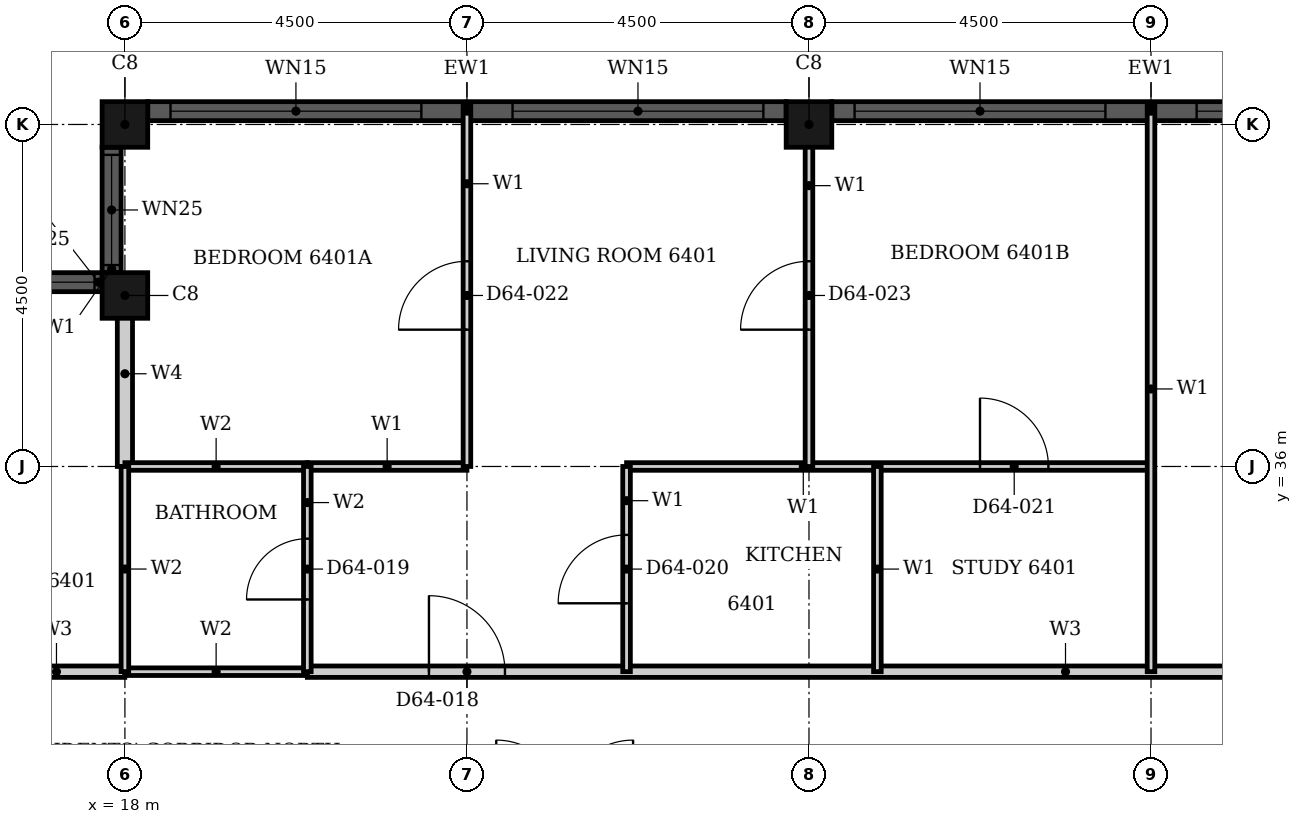
"""IFC4 building model, lengths in metres.
Left out: names, types, materials, properties, quantities, classifications, styles, units other than length and angle.
Written with IfcOpenShell. Run it as: python <this file> out.ifc"""

import sys

from ifc_helpers import new_model, si_unit, direction, frame, frame_2d, origin, origin_2d, place, context, subcontext, project, spatial, rectangle, hollow_rectangle, extrude, element, fill, save


model = new_model("IFC4")
c1 = context("Model", 3, precision=1e-05, world=origin(), true_north=direction((0.0, 1.0)))
c2 = subcontext(c1, "Body", "Model", "MODEL_VIEW")
j1 = project(units=[si_unit("LENGTHUNIT", "METRE"), si_unit("PLANEANGLEUNIT", "RADIAN")], contexts=[c1])
p1 = place(None, origin())
s1 = spatial("IfcSite", under=j1, at=p1, CompositionType="ELEMENT")
p2 = place(p1, origin())
s2 = spatial("IfcBuilding", under=s1, at=p2, CompositionType="ELEMENT")
p3 = place(p2, frame((0.0, 0.0, 252.7)))
s3 = spatial("IfcBuildingStorey", under=s2, at=p3, CompositionType="ELEMENT", Elevation=252.7)
for number, where, z_axis, x_axis in (
    (1, (27.0, 40.5, 0.0), (0.0, 0.0, 1.0), (1.0, 0.0, 0.0)),
    (2, (18.0, 40.5, 0.0), (0.0, 0.0, 1.0), (1.0, 0.0, 0.0)),
    (3, (18.0, 38.25, 0.0), (0.0, 0.0, 1.0), (1.0, 0.0, 0.0)),
):
    element("IfcColumn", number, at=place(p3, frame(where, z_axis=z_axis, x_axis=x_axis)), inside=s3, PredefinedType="COLUMN", context=c2, shape_type="SweptSolid", body=[
        extrude(hollow_rectangle(XDim=0.6, YDim=0.6, WallThickness=0.02, at=origin_2d()), origin(), (0.0, 0.0, 1.0), 3.7),
    ])
p4 = place(p3, frame((35.7, 40.675, 0.0), z_axis=(0.0, 0.0, 1.0), x_axis=(-1.0, 0.0, 0.0)))
e4 = element("IfcWall", 4, at=p4, inside=s3, PredefinedType="SOLIDWALL", context=c2, shape_type="SweptSolid", body=[
    extrude(rectangle(XDim=8.4, YDim=0.25, at=frame_2d((4.2, 0.0))), origin(), (0.0, 0.0, 1.0), 3.7),
])
p5 = place(p4, frame((0.3, 0.0, 0.45)))
e5 = element("IfcOpeningElement", 5, at=p5, cuts=e4, PredefinedType="OPENING", context=c2, shape_type="SweptSolid", body=[
    extrude(rectangle(XDim=3.3, YDim=2.3, at=frame_2d((1.65, 1.15))), frame((0.0, 0.135, 0.0), z_axis=(0.0, -1.0, 0.0), x_axis=(1.0, 0.0, 0.0)), (0.0, 0.0, 1.0), 0.27),
])
p6 = place(p4, frame((4.8, 0.0, 0.45)))
e6 = element("IfcOpeningElement", 6, at=p6, cuts=e4, PredefinedType="OPENING", context=c2, shape_type="SweptSolid", body=[
    extrude(rectangle(XDim=3.3, YDim=2.3, at=frame_2d((1.65, 1.15))), frame((0.0, 0.135, 0.0), z_axis=(0.0, -1.0, 0.0), x_axis=(1.0, 0.0, 0.0)), (0.0, 0.0, 1.0), 0.27),
])
p7 = place(p3, frame((26.7, 40.675, 0.0), z_axis=(0.0, 0.0, 1.0), x_axis=(-1.0, 0.0, 0.0)))
e7 = element("IfcWall", 7, at=p7, inside=s3, PredefinedType="SOLIDWALL", context=c2, shape_type="SweptSolid", body=[
    extrude(rectangle(XDim=8.4, YDim=0.25, at=frame_2d((4.2, 0.0))), origin(), (0.0, 0.0, 1.0), 3.7),
])
p8 = place(p7, frame((0.3, 0.0, 0.45)))
e8 = element("IfcOpeningElement", 8, at=p8, cuts=e7, PredefinedType="OPENING", context=c2, shape_type="SweptSolid", body=[
    extrude(rectangle(XDim=3.3, YDim=2.3, at=frame_2d((1.65, 1.15))), frame((0.0, 0.135, 0.0), z_axis=(0.0, -1.0, 0.0), x_axis=(1.0, 0.0, 0.0)), (0.0, 0.0, 1.0), 0.27),
])
p9 = place(p7, frame((4.8, 0.0, 0.45)))
e9 = element("IfcOpeningElement", 9, at=p9, cuts=e7, PredefinedType="OPENING", context=c2, shape_type="SweptSolid", body=[
    extrude(rectangle(XDim=3.3, YDim=2.3, at=frame_2d((1.65, 1.15))), frame((0.0, 0.135, 0.0), z_axis=(0.0, -1.0, 0.0), x_axis=(1.0, 0.0, 0.0)), (0.0, 0.0, 1.0), 0.27),
])
p10 = place(p3, frame((17.825, 40.2, 0.0), z_axis=(0.0, 0.0, 1.0), x_axis=(0.0, -1.0, 0.0)))
e10 = element("IfcWall", 10, at=p10, inside=s3, PredefinedType="SOLIDWALL", context=c2, shape_type="SweptSolid", body=[
    extrude(rectangle(XDim=1.65, YDim=0.25, at=frame_2d((0.825, 0.0))), origin(), (0.0, 0.0, 1.0), 3.7),
])
p11 = place(p10, frame((0.1, 0.0, 0.9)))
e11 = element("IfcOpeningElement", 11, at=p11, cuts=e10, PredefinedType="OPENING", context=c2, shape_type="SweptSolid", body=[
    extrude(rectangle(XDim=1.45, YDim=1.85, at=frame_2d((0.725, 0.925))), frame((0.0, 0.135, 0.0), z_axis=(0.0, -1.0, 0.0), x_axis=(1.0, 0.0, 0.0)), (0.0, 0.0, 1.0), 0.27),
])
p12 = place(p3, frame((17.7, 38.425, 0.0), z_axis=(0.0, 0.0, 1.0), x_axis=(-1.0, 0.0, 0.0)))
e12 = element("IfcWall", 12, at=p12, inside=s3, PredefinedType="SOLIDWALL", context=c2, shape_type="SweptSolid", body=[
    extrude(rectangle(XDim=1.65, YDim=0.25, at=frame_2d((0.825, 0.0))), origin(), (0.0, 0.0, 1.0), 3.7),
])
p13 = place(p12, frame((0.1, 0.0, 0.9)))
e13 = element("IfcOpeningElement", 13, at=p13, cuts=e12, PredefinedType="OPENING", context=c2, shape_type="SweptSolid", body=[
    extrude(rectangle(XDim=1.45, YDim=1.85, at=frame_2d((0.725, 0.925))), frame((0.0, 0.135, 0.0), z_axis=(0.0, -1.0, 0.0), x_axis=(1.0, 0.0, 0.0)), (0.0, 0.0, 1.0), 0.27),
])
p14 = place(p3, frame((20.4, 33.3, 0.0), z_axis=(0.0, 0.0, 1.0), x_axis=(1.0, 0.0, 0.0)))
e14 = element("IfcWall", 14, at=p14, inside=s3, PredefinedType="PARTITIONING", context=c2, shape_type="SweptSolid", body=[
    extrude(rectangle(XDim=24.6, YDim=0.15, at=frame_2d((12.3, 0.0))), origin(), (0.0, 0.0, 1.0), 3.4),
])
p15 = place(p14, frame((1.6, 0.0, 0.0)))
e15 = element("IfcOpeningElement", 15, at=p15, cuts=e14, PredefinedType="OPENING", context=c2, shape_type="SweptSolid", body=[
    extrude(rectangle(XDim=1.0, YDim=2.2, at=frame_2d((0.5, 1.1))), frame((0.0, 0.085, 0.0), z_axis=(0.0, -1.0, 0.0), x_axis=(1.0, 0.0, 0.0)), (0.0, 0.0, 1.0), 0.17),
])
p16 = place(p14, frame((17.35, 0.0, 0.0)))
e16 = element("IfcOpeningElement", 16, at=p16, cuts=e14, PredefinedType="OPENING", context=c2, shape_type="SweptSolid", body=[
    extrude(rectangle(XDim=1.0, YDim=2.1, at=frame_2d((0.5, 1.05))), frame((0.0, 0.085, 0.0), z_axis=(0.0, -1.0, 0.0), x_axis=(1.0, 0.0, 0.0)), (0.0, 0.0, 1.0), 0.17),
])
p17 = place(p3, frame((16.2, 33.3, 0.0), z_axis=(0.0, 0.0, 1.0), x_axis=(1.0, 0.0, 0.0)))
e17 = element("IfcWall", 17, at=p17, inside=s3, PredefinedType="PARTITIONING", context=c2, shape_type="SweptSolid", body=[
    extrude(rectangle(XDim=1.799, YDim=0.15, at=frame_2d((0.899, 0.0))), origin(), (0.0, 0.0, 1.0), 3.4),
])
p18 = place(p3, frame((20.4, 36.0, 0.0), z_axis=(0.0, 0.0, 1.0), x_axis=(1.0, 0.0, 0.0)))
e18 = element("IfcWall", 18, at=p18, inside=s3, PredefinedType="PARTITIONING", context=c2, shape_type="SweptSolid", body=[
    extrude(rectangle(XDim=2.1, YDim=0.1, at=frame_2d((1.05, 0.0))), origin(), (0.0, 0.0, 1.0), 3.4),
])
p19 = place(p3, frame((24.6, 36.0, 0.0), z_axis=(0.0, 0.0, 1.0), x_axis=(1.0, 0.0, 0.0)))
e19 = element("IfcWall", 19, at=p19, inside=s3, PredefinedType="PARTITIONING", context=c2, shape_type="SweptSolid", body=[
    extrude(rectangle(XDim=6.9, YDim=0.1, at=frame_2d((3.45, 0.0))), origin(), (0.0, 0.0, 1.0), 3.4),
])
p20 = place(p19, frame((4.65, 0.0, 0.0)))
e20 = element("IfcOpeningElement", 20, at=p20, cuts=e19, PredefinedType="OPENING", context=c2, shape_type="SweptSolid", body=[
    extrude(rectangle(XDim=0.9, YDim=2.1, at=frame_2d((0.45, 1.05))), frame((0.0, 0.06, 0.0), z_axis=(0.0, -1.0, 0.0), x_axis=(1.0, 0.0, 0.0)), (0.0, 0.0, 1.0), 0.12),
])
p21 = place(p3, frame((22.5, 36.0, 0.0), z_axis=(0.0, 0.0, 1.0), x_axis=(0.0, 1.0, 0.0)))
e21 = element("IfcWall", 21, at=p21, inside=s3, PredefinedType="PARTITIONING", context=c2, shape_type="SweptSolid", body=[
    extrude(rectangle(XDim=4.74, YDim=0.1, at=frame_2d((2.37, 0.0))), origin(), (0.0, 0.0, 1.0), 3.4),
])
p22 = place(p21, frame((1.8, 0.0, 0.0)))
e22 = element("IfcOpeningElement", 22, at=p22, cuts=e21, PredefinedType="OPENING", context=c2, shape_type="SweptSolid", body=[
    extrude(rectangle(XDim=0.9, YDim=2.1, at=frame_2d((0.45, 1.05))), frame((0.0, 0.06, 0.0), z_axis=(0.0, -1.0, 0.0), x_axis=(1.0, 0.0, 0.0)), (0.0, 0.0, 1.0), 0.12),
])
p23 = place(p3, frame((24.6, 33.3, 0.0), z_axis=(0.0, 0.0, 1.0), x_axis=(0.0, 1.0, 0.0)))
e23 = element("IfcWall", 23, at=p23, inside=s3, PredefinedType="PARTITIONING", context=c2, shape_type="SweptSolid", body=[
    extrude(rectangle(XDim=2.7, YDim=0.1, at=frame_2d((1.35, 0.0))), origin(), (0.0, 0.0, 1.0), 3.4),
])
p24 = place(p23, frame((0.9, 0.0, 0.0)))
e24 = element("IfcOpeningElement", 24, at=p24, cuts=e23, PredefinedType="OPENING", context=c2, shape_type="SweptSolid", body=[
    extrude(rectangle(XDim=0.9, YDim=2.1, at=frame_2d((0.45, 1.05))), frame((0.0, 0.06, 0.0), z_axis=(0.0, -1.0, 0.0), x_axis=(1.0, 0.0, 0.0)), (0.0, 0.0, 1.0), 0.12),
])
p25 = place(p3, frame((27.0, 36.0, 0.0), z_axis=(0.0, 0.0, 1.0), x_axis=(0.0, 1.0, 0.0)))
e25 = element("IfcWall", 25, at=p25, inside=s3, PredefinedType="PARTITIONING", context=c2, shape_type="SweptSolid", body=[
    extrude(rectangle(XDim=4.69, YDim=0.1, at=frame_2d((2.345, 0.0))), origin(), (0.0, 0.0, 1.0), 3.4),
])
p26 = place(p25, frame((1.8, 0.0, 0.0)))
e26 = element("IfcOpeningElement", 26, at=p26, cuts=e25, PredefinedType="OPENING", context=c2, shape_type="SweptSolid", body=[
    extrude(rectangle(XDim=0.9, YDim=2.1, at=frame_2d((0.45, 1.05))), frame((0.0, 0.06, 0.0), z_axis=(0.0, -1.0, 0.0), x_axis=(1.0, 0.0, 0.0)), (0.0, 0.0, 1.0), 0.12),
])
p27 = place(p3, frame((27.9, 33.3, 0.0), z_axis=(0.0, 0.0, 1.0), x_axis=(0.0, 1.0, 0.0)))
e27 = element("IfcWall", 27, at=p27, inside=s3, PredefinedType="PARTITIONING", context=c2, shape_type="SweptSolid", body=[
    extrude(rectangle(XDim=2.7, YDim=0.1, at=frame_2d((1.35, 0.0))), origin(), (0.0, 0.0, 1.0), 3.4),
])
p28 = place(p3, frame((31.5, 33.3, 0.0), z_axis=(0.0, 0.0, 1.0), x_axis=(0.0, 1.0, 0.0)))
e28 = element("IfcWall", 28, at=p28, inside=s3, PredefinedType="PARTITIONING", context=c2, shape_type="SweptSolid", body=[
    extrude(rectangle(XDim=7.44, YDim=0.1, at=frame_2d((3.72, 0.0))), origin(), (0.0, 0.0, 1.0), 3.4),
])
p29 = place(p3, frame((18.0, 36.0, 0.0), z_axis=(0.0, 0.0, 1.0), x_axis=(0.0, 1.0, 0.0)))
e29 = element("IfcWall", 29, at=p29, inside=s3, PredefinedType="PARTITIONING", context=c2, shape_type="SweptSolid", body=[
    extrude(rectangle(XDim=2.44, YDim=0.2, at=frame_2d((1.22, 0.0))), origin(), (0.0, 0.0, 1.0), 3.4),
])
for number, where, z_axis, x_axis in (
    (30, (18.0, 33.3, 0.0), (0.0, 0.0, 1.0), (1.0, 0.0, 0.0)),
    (31, (18.0, 36.0, 0.0), (0.0, 0.0, 1.0), (1.0, 0.0, 0.0)),
):
    element("IfcWall", number, at=place(p3, frame(where, z_axis=z_axis, x_axis=x_axis)), inside=s3, PredefinedType="PARTITIONING", context=c2, shape_type="SweptSolid", body=[
        extrude(rectangle(XDim=2.4, YDim=0.1, at=frame_2d((1.2, 0.0))), origin(), (0.0, 0.0, 1.0), 3.4),
    ])
p30 = place(p3, frame((18.0, 33.301, 0.0), z_axis=(0.0, 0.0, 1.0), x_axis=(0.0, 1.0, 0.0)))
e32 = element("IfcWall", 32, at=p30, inside=s3, PredefinedType="PARTITIONING", context=c2, shape_type="SweptSolid", body=[
    extrude(rectangle(XDim=2.699, YDim=0.1, at=frame_2d((1.35, 0.0))), origin(), (0.0, 0.0, 1.0), 3.4),
])
p31 = place(p3, frame((20.4, 33.3, 0.0), z_axis=(0.0, 0.0, 1.0), x_axis=(0.0, 1.0, 0.0)))
e33 = element("IfcWall", 33, at=p31, inside=s3, PredefinedType="PARTITIONING", context=c2, shape_type="SweptSolid", body=[
    extrude(rectangle(XDim=2.7, YDim=0.1, at=frame_2d((1.35, 0.0))), origin(), (0.0, 0.0, 1.0), 3.4),
])
p32 = place(p31, frame((0.95, 0.0, 0.0)))
e34 = element("IfcOpeningElement", 34, at=p32, cuts=e33, PredefinedType="OPENING", context=c2, shape_type="SweptSolid", body=[
    extrude(rectangle(XDim=0.8, YDim=2.1, at=frame_2d((0.4, 1.05))), frame((0.0, 0.06, 0.0), z_axis=(0.0, -1.0, 0.0), x_axis=(1.0, 0.0, 0.0)), (0.0, 0.0, 1.0), 0.12),
])
p33 = place(p5, origin())
e35 = element("IfcWindow", 35, at=p33, inside=s3, PartitioningType="SINGLE_PANEL", PredefinedType="WINDOW", context=c2, shape_type="SweptSolid", body=[
    extrude(rectangle(XDim=3.3, YDim=2.3, at=frame_2d((1.65, 1.15))), frame((0.0, 0.03, 0.0), z_axis=(0.0, -1.0, 0.0), x_axis=(1.0, 0.0, 0.0)), (0.0, 0.0, 1.0), 0.06),
])
fill(e5, e35)
p34 = place(p6, origin())
e36 = element("IfcWindow", 36, at=p34, inside=s3, PartitioningType="SINGLE_PANEL", PredefinedType="WINDOW", context=c2, shape_type="SweptSolid", body=[
    extrude(rectangle(XDim=3.3, YDim=2.3, at=frame_2d((1.65, 1.15))), frame((0.0, 0.03, 0.0), z_axis=(0.0, -1.0, 0.0), x_axis=(1.0, 0.0, 0.0)), (0.0, 0.0, 1.0), 0.06),
])
fill(e6, e36)
p35 = place(p8, origin())
e37 = element("IfcWindow", 37, at=p35, inside=s3, PartitioningType="SINGLE_PANEL", PredefinedType="WINDOW", context=c2, shape_type="SweptSolid", body=[
    extrude(rectangle(XDim=3.3, YDim=2.3, at=frame_2d((1.65, 1.15))), frame((0.0, 0.03, 0.0), z_axis=(0.0, -1.0, 0.0), x_axis=(1.0, 0.0, 0.0)), (0.0, 0.0, 1.0), 0.06),
])
fill(e8, e37)
p36 = place(p9, origin())
e38 = element("IfcWindow", 38, at=p36, inside=s3, PartitioningType="SINGLE_PANEL", PredefinedType="WINDOW", context=c2, shape_type="SweptSolid", body=[
    extrude(rectangle(XDim=3.3, YDim=2.3, at=frame_2d((1.65, 1.15))), frame((0.0, 0.03, 0.0), z_axis=(0.0, -1.0, 0.0), x_axis=(1.0, 0.0, 0.0)), (0.0, 0.0, 1.0), 0.06),
])
fill(e9, e38)
p37 = place(p11, origin())
e39 = element("IfcWindow", 39, at=p37, inside=s3, PartitioningType="SINGLE_PANEL", PredefinedType="WINDOW", context=c2, shape_type="SweptSolid", body=[
    extrude(rectangle(XDim=1.45, YDim=1.85, at=frame_2d((0.725, 0.925))), frame((0.0, 0.03, 0.0), z_axis=(0.0, -1.0, 0.0), x_axis=(1.0, 0.0, 0.0)), (0.0, 0.0, 1.0), 0.06),
])
fill(e11, e39)
p38 = place(p13, origin())
e40 = element("IfcWindow", 40, at=p38, inside=s3, PartitioningType="SINGLE_PANEL", PredefinedType="WINDOW", context=c2, shape_type="SweptSolid", body=[
    extrude(rectangle(XDim=1.45, YDim=1.85, at=frame_2d((0.725, 0.925))), frame((0.0, 0.03, 0.0), z_axis=(0.0, -1.0, 0.0), x_axis=(1.0, 0.0, 0.0)), (0.0, 0.0, 1.0), 0.06),
])
fill(e13, e40)
p39 = place(p15, origin())
e41 = element("IfcDoor", 41, at=p39, inside=s3, OperationType="SINGLE_SWING_RIGHT", PredefinedType="DOOR", context=c2, shape_type="SweptSolid", body=[
    extrude(rectangle(XDim=1.0, YDim=2.2, at=frame_2d((0.5, 1.1))), frame((0.0, 0.025, 0.0), z_axis=(0.0, -1.0, 0.0), x_axis=(1.0, 0.0, 0.0)), (0.0, 0.0, 1.0), 0.05),
])
fill(e15, e41)
p40 = place(p32, origin())
e42 = element("IfcDoor", 42, at=p40, inside=s3, OperationType="SINGLE_SWING_RIGHT", PredefinedType="DOOR", context=c2, shape_type="SweptSolid", body=[
    extrude(rectangle(XDim=0.8, YDim=2.1, at=frame_2d((0.4, 1.05))), frame((0.0, 0.025, 0.0), z_axis=(0.0, -1.0, 0.0), x_axis=(1.0, 0.0, 0.0)), (0.0, 0.0, 1.0), 0.05),
])
fill(e34, e42)
p41 = place(p24, origin())
e43 = element("IfcDoor", 43, at=p41, inside=s3, OperationType="SINGLE_SWING_LEFT", PredefinedType="DOOR", context=c2, shape_type="SweptSolid", body=[
    extrude(rectangle(XDim=0.9, YDim=2.1, at=frame_2d((0.45, 1.05))), frame((0.0, 0.025, 0.0), z_axis=(0.0, -1.0, 0.0), x_axis=(1.0, 0.0, 0.0)), (0.0, 0.0, 1.0), 0.05),
])
fill(e24, e43)
p42 = place(p20, origin())
e44 = element("IfcDoor", 44, at=p42, inside=s3, OperationType="SINGLE_SWING_RIGHT", PredefinedType="DOOR", context=c2, shape_type="SweptSolid", body=[
    extrude(rectangle(XDim=0.9, YDim=2.1, at=frame_2d((0.45, 1.05))), frame((0.0, 0.025, 0.0), z_axis=(0.0, -1.0, 0.0), x_axis=(1.0, 0.0, 0.0)), (0.0, 0.0, 1.0), 0.05),
])
fill(e20, e44)
p43 = place(p22, origin())
e45 = element("IfcDoor", 45, at=p43, inside=s3, OperationType="SINGLE_SWING_LEFT", PredefinedType="DOOR", context=c2, shape_type="SweptSolid", body=[
    extrude(rectangle(XDim=0.9, YDim=2.1, at=frame_2d((0.45, 1.05))), frame((0.0, 0.025, 0.0), z_axis=(0.0, -1.0, 0.0), x_axis=(1.0, 0.0, 0.0)), (0.0, 0.0, 1.0), 0.05),
])
fill(e22, e45)
p44 = place(p26, origin())
e46 = element("IfcDoor", 46, at=p44, inside=s3, OperationType="SINGLE_SWING_RIGHT", PredefinedType="DOOR", context=c2, shape_type="SweptSolid", body=[
    extrude(rectangle(XDim=0.9, YDim=2.1, at=frame_2d((0.45, 1.05))), frame((0.0, 0.025, 0.0), z_axis=(0.0, -1.0, 0.0), x_axis=(1.0, 0.0, 0.0)), (0.0, 0.0, 1.0), 0.05),
])
fill(e26, e46)
save(model, sys.argv[1])
